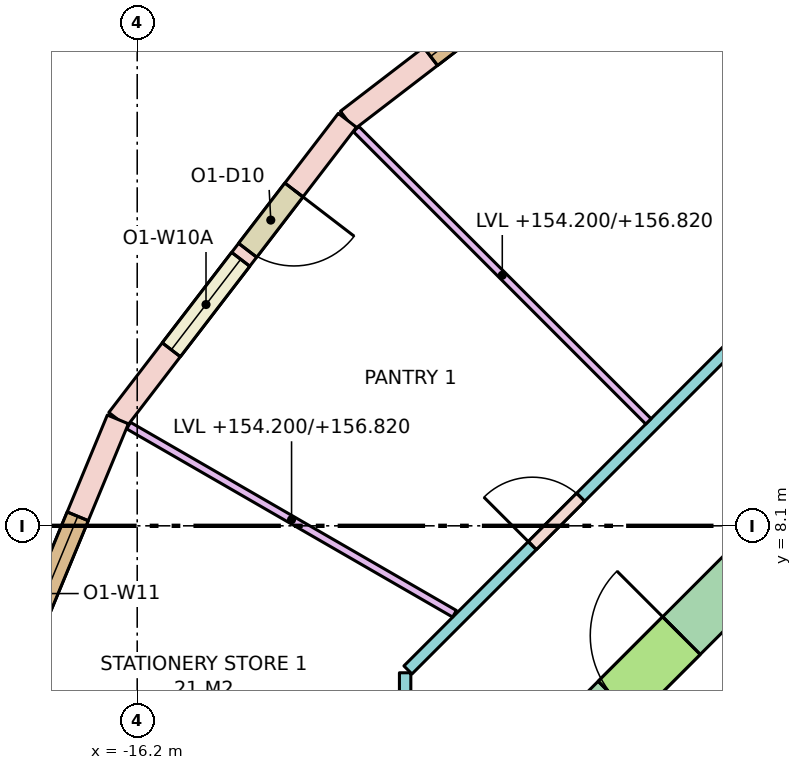
"""IFC4 building model, lengths in metres.
Left out: names, types, materials, properties, quantities, classifications, styles, units other than length and angle.
Written with IfcOpenShell. Run it as: python <this file> out.ifc"""

import sys

from ifc_helpers import new_model, si_unit, direction, frame, frame_2d, origin, place, context, subcontext, project, spatial, rectangle, extrude, element, fill, save


model = new_model("IFC4")
c1 = context("Model", 3, precision=1e-05, world=origin(), true_north=direction((0.0, 1.0)))
c2 = subcontext(c1, "Body", "Model", "MODEL_VIEW")
j1 = project(units=[si_unit("LENGTHUNIT", "METRE"), si_unit("PLANEANGLEUNIT", "RADIAN")], contexts=[c1])
p1 = place(None, origin())
s1 = spatial("IfcSite", under=j1, at=p1, CompositionType="ELEMENT")
p2 = place(p1, origin())
s2 = spatial("IfcBuilding", under=s1, at=p2, CompositionType="ELEMENT")
p3 = place(p2, frame((0.0, 0.0, 154.2)))
s3 = spatial("IfcBuildingStorey", under=s2, at=p3, CompositionType="ELEMENT", Elevation=154.2)
p4 = place(p3, frame((-10.347, 5.347, -0.28), z_axis=(0.0, 0.0, 1.0), x_axis=(0.707106781187, 0.707106781187, 0.0)))
e1 = element("IfcWall", 1, at=p4, inside=s3, PredefinedType="SHEAR", context=c2, shape_type="SweptSolid", body=[
    extrude(rectangle(XDim=4.243, YDim=0.7, at=frame_2d((2.121, 0.0))), origin(), (0.0, 0.0, 1.0), 3.7),
])
p5 = place(p4, frame((0.65, 0.0, 0.28)))
e2 = element("IfcOpeningElement", 2, at=p5, cuts=e1, PredefinedType="OPENING", context=c2, shape_type="SweptSolid", body=[
    extrude(rectangle(XDim=1.2, YDim=2.1, at=frame_2d((0.6, 1.05))), frame((0.0, 0.36, 0.0), z_axis=(0.0, -1.0, 0.0), x_axis=(1.0, 0.0, 0.0)), (0.0, 0.0, 1.0), 0.72),
])
p6 = place(p3, frame((-9.5, 16.455, 0.0), z_axis=(0.0, 0.0, 1.0), x_axis=(-0.793348024649, -0.608768356425, 0.0)))
e3 = element("IfcWall", 3, at=p6, inside=s3, PredefinedType="STANDARD", context=c2, shape_type="SweptSolid", body=[
    extrude(rectangle(XDim=4.96, YDim=0.3, at=frame_2d((2.48, 0.0))), origin(), (0.0, 0.0, 1.0), 3.42),
])
p7 = place(p6, frame((1.38, 0.0, 0.8)))
e4 = element("IfcOpeningElement", 4, at=p7, cuts=e3, PredefinedType="OPENING", context=c2, shape_type="SweptSolid", body=[
    extrude(rectangle(XDim=2.2, YDim=2.4, at=frame_2d((1.1, 1.2))), frame((0.0, 0.16, 0.0), z_axis=(0.0, -1.0, 0.0), x_axis=(1.0, 0.0, 0.0)), (0.0, 0.0, 1.0), 0.32),
])
p8 = place(p3, frame((-13.435, 13.435, 0.0), z_axis=(0.0, 0.0, 1.0), x_axis=(-0.608768356425, -0.793348024649, 0.0)))
e5 = element("IfcWall", 5, at=p8, inside=s3, PredefinedType="STANDARD", context=c2, shape_type="SweptSolid", body=[
    extrude(rectangle(XDim=4.96, YDim=0.3, at=frame_2d((2.48, 0.0))), origin(), (0.0, 0.0, 1.0), 3.42),
])
p9 = place(p8, frame((1.155, 0.0, 0.0)))
e6 = element("IfcOpeningElement", 6, at=p9, cuts=e5, PredefinedType="OPENING", context=c2, shape_type="SweptSolid", body=[
    extrude(rectangle(XDim=1.0, YDim=2.4, at=frame_2d((0.5, 1.2))), frame((0.0, 0.16, 0.0), z_axis=(0.0, -1.0, 0.0), x_axis=(1.0, 0.0, 0.0)), (0.0, 0.0, 1.0), 0.32),
])
p10 = place(p8, frame((2.305, 0.0, 0.8)))
e7 = element("IfcOpeningElement", 7, at=p10, cuts=e5, PredefinedType="OPENING", context=c2, shape_type="SweptSolid", body=[
    extrude(rectangle(XDim=1.5, YDim=2.4, at=frame_2d((0.75, 1.2))), frame((0.0, 0.16, 0.0), z_axis=(0.0, -1.0, 0.0), x_axis=(1.0, 0.0, 0.0)), (0.0, 0.0, 1.0), 0.32),
])
p11 = place(p3, frame((-16.455, 9.5, 0.0), z_axis=(0.0, 0.0, 1.0), x_axis=(-0.382650301762, -0.923893254961, 0.0)))
e8 = element("IfcWall", 8, at=p11, inside=s3, PredefinedType="STANDARD", context=c2, shape_type="SweptSolid", body=[
    extrude(rectangle(XDim=4.96, YDim=0.3, at=frame_2d((2.48, 0.0))), origin(), (0.0, 0.0, 1.0), 3.42),
])
p12 = place(p11, frame((1.38, 0.0, 0.8)))
e9 = element("IfcOpeningElement", 9, at=p12, cuts=e8, PredefinedType="OPENING", context=c2, shape_type="SweptSolid", body=[
    extrude(rectangle(XDim=2.2, YDim=2.4, at=frame_2d((1.1, 1.2))), frame((0.0, 0.16, 0.0), z_axis=(0.0, -1.0, 0.0), x_axis=(1.0, 0.0, 0.0)), (0.0, 0.0, 1.0), 0.32),
])
p13 = place(p3, frame((-12.675, -6.167, 0.0), z_axis=(0.0, 0.0, 1.0), x_axis=(0.0, 1.0, 0.0)))
e10 = element("IfcWall", 10, at=p13, inside=s3, PredefinedType="PARTITIONING", context=c2, shape_type="SweptSolid", body=[
    extrude(rectangle(XDim=12.333, YDim=0.15, at=frame_2d((6.167, 0.0))), origin(), (0.0, 0.0, 1.0), 2.62),
])
p14 = place(p13, frame((10.473, 0.0, 0.0)))
e11 = element("IfcOpeningElement", 11, at=p14, cuts=e10, PredefinedType="OPENING", context=c2, shape_type="SweptSolid", body=[
    extrude(rectangle(XDim=0.9, YDim=2.1, at=frame_2d((0.45, 1.05))), frame((0.0, 0.085, 0.0), z_axis=(0.0, -1.0, 0.0), x_axis=(1.0, 0.0, 0.0)), (0.0, 0.0, 1.0), 0.17),
])
p15 = place(p13, frame((3.907, 0.0, 0.0)))
e12 = element("IfcOpeningElement", 12, at=p15, cuts=e10, PredefinedType="OPENING", context=c2, shape_type="SweptSolid", body=[
    extrude(rectangle(XDim=1.8, YDim=2.1, at=frame_2d((0.9, 1.05))), frame((0.0, 0.085, 0.0), z_axis=(0.0, -1.0, 0.0), x_axis=(1.0, 0.0, 0.0)), (0.0, 0.0, 1.0), 0.17),
])
p16 = place(p3, frame((-12.638, 6.204, 0.0), z_axis=(0.0, 0.0, 1.0), x_axis=(0.707106781187, 0.707106781187, 0.0)))
e13 = element("IfcWall", 13, at=p16, inside=s3, PredefinedType="PARTITIONING", context=c2, shape_type="SweptSolid", body=[
    extrude(rectangle(XDim=6.271, YDim=0.15, at=frame_2d((3.135, 0.0))), origin(), (0.0, 0.0, 1.0), 2.62),
])
p17 = place(p16, frame((2.314, 0.0, 0.0)))
e14 = element("IfcOpeningElement", 14, at=p17, cuts=e13, PredefinedType="OPENING", context=c2, shape_type="SweptSolid", body=[
    extrude(rectangle(XDim=0.9, YDim=2.1, at=frame_2d((0.45, 1.05))), frame((0.0, 0.085, 0.0), z_axis=(0.0, -1.0, 0.0), x_axis=(1.0, 0.0, 0.0)), (0.0, 0.0, 1.0), 0.17),
])
p18 = place(p3, frame((-9.474, 9.474, 0.0), z_axis=(0.0, 0.0, 1.0), x_axis=(-0.707106781187, 0.707106781187, 0.0)))
e15 = element("IfcWall", 15, at=p18, inside=s3, PredefinedType="PARTITIONING", context=c2, shape_type="SweptSolid", body=[
    extrude(rectangle(XDim=5.439, YDim=0.1, at=frame_2d((2.719, 0.0))), origin(), (0.0, 0.0, 1.0), 2.62),
])
p19 = place(p3, frame((-12.025, 6.943, 0.0), z_axis=(0.0, 0.0, 1.0), x_axis=(-0.866025463095, 0.499999897272, 0.0)))
e16 = element("IfcWall", 16, at=p19, inside=s3, PredefinedType="PARTITIONING", context=c2, shape_type="SweptSolid", body=[
    extrude(rectangle(XDim=4.951, YDim=0.1, at=frame_2d((2.476, 0.0))), origin(), (0.0, 0.0, 1.0), 2.62),
])
p20 = place(p7, origin())
e17 = element("IfcWindow", 17, at=p20, inside=s3, PartitioningType="SINGLE_PANEL", PredefinedType="WINDOW", context=c2, shape_type="SweptSolid", body=[
    extrude(rectangle(XDim=2.2, YDim=2.4, at=frame_2d((1.1, 1.2))), frame((0.0, 0.03, 0.0), z_axis=(0.0, -1.0, 0.0), x_axis=(1.0, 0.0, 0.0)), (0.0, 0.0, 1.0), 0.06),
])
fill(e4, e17)
p21 = place(p9, origin())
e18 = element("IfcDoor", 18, at=p21, inside=s3, OperationType="SINGLE_SWING_LEFT", PredefinedType="DOOR", context=c2, shape_type="SweptSolid", body=[
    extrude(rectangle(XDim=1.0, YDim=2.4, at=frame_2d((0.5, 1.2))), frame((0.0, 0.025, 0.0), z_axis=(0.0, -1.0, 0.0), x_axis=(1.0, 0.0, 0.0)), (0.0, 0.0, 1.0), 0.05),
])
fill(e6, e18)
p22 = place(p10, origin())
e19 = element("IfcWindow", 19, at=p22, inside=s3, PartitioningType="SINGLE_PANEL", PredefinedType="WINDOW", context=c2, shape_type="SweptSolid", body=[
    extrude(rectangle(XDim=1.5, YDim=2.4, at=frame_2d((0.75, 1.2))), frame((0.0, 0.03, 0.0), z_axis=(0.0, -1.0, 0.0), x_axis=(1.0, 0.0, 0.0)), (0.0, 0.0, 1.0), 0.06),
])
fill(e7, e19)
p23 = place(p12, origin())
e20 = element("IfcWindow", 20, at=p23, inside=s3, PartitioningType="SINGLE_PANEL", PredefinedType="WINDOW", context=c2, shape_type="SweptSolid", body=[
    extrude(rectangle(XDim=2.2, YDim=2.4, at=frame_2d((1.1, 1.2))), frame((0.0, 0.03, 0.0), z_axis=(0.0, -1.0, 0.0), x_axis=(1.0, 0.0, 0.0)), (0.0, 0.0, 1.0), 0.06),
])
fill(e9, e20)
p24 = place(p5, origin())
e21 = element("IfcDoor", 21, at=p24, inside=s3, OperationType="SINGLE_SWING_RIGHT", PredefinedType="DOOR", context=c2, shape_type="SweptSolid", body=[
    extrude(rectangle(XDim=1.2, YDim=2.1, at=frame_2d((0.6, 1.05))), frame((0.0, 0.025, 0.0), z_axis=(0.0, -1.0, 0.0), x_axis=(1.0, 0.0, 0.0)), (0.0, 0.0, 1.0), 0.05),
])
fill(e2, e21)
p25 = place(p17, origin())
e22 = element("IfcDoor", 22, at=p25, inside=s3, OperationType="SINGLE_SWING_LEFT", PredefinedType="DOOR", context=c2, shape_type="SweptSolid", body=[
    extrude(rectangle(XDim=0.9, YDim=2.1, at=frame_2d((0.45, 1.05))), frame((0.0, 0.025, 0.0), z_axis=(0.0, -1.0, 0.0), x_axis=(1.0, 0.0, 0.0)), (0.0, 0.0, 1.0), 0.05),
])
fill(e14, e22)
save(model, sys.argv[1])
